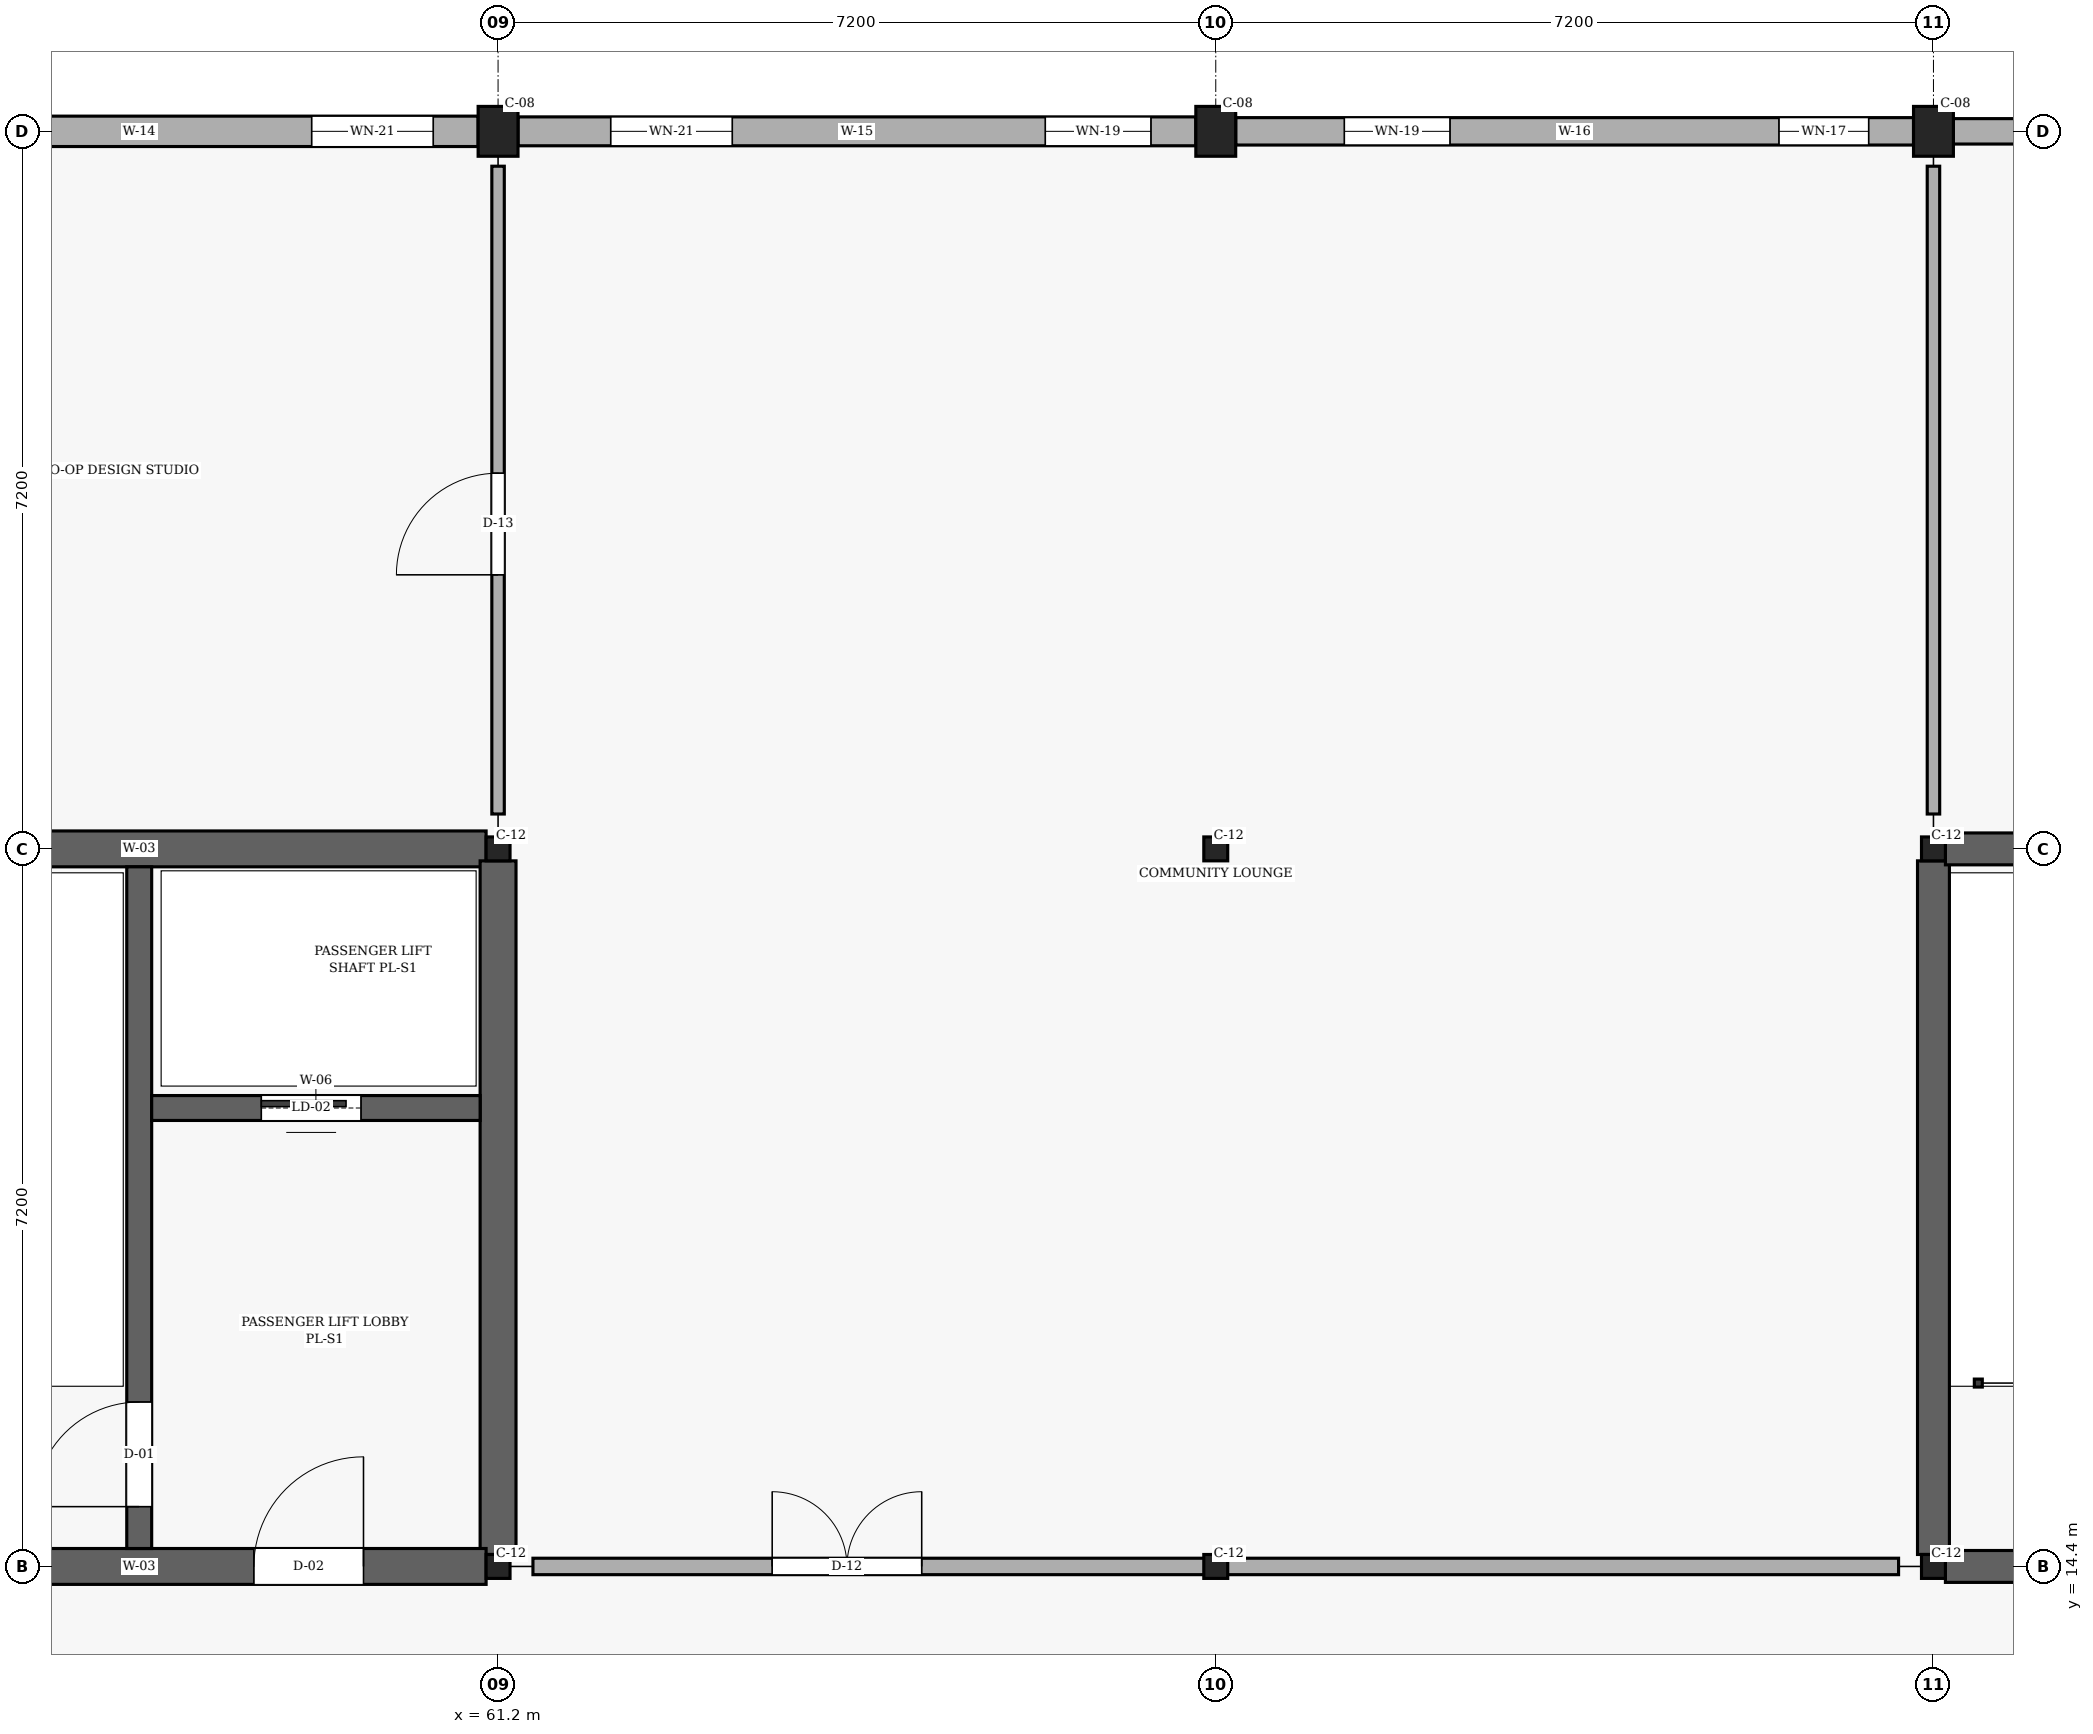
"""IFC4 building model, lengths in metres.
Left out: names, types, materials, properties, quantities, classifications, styles, units other than length and angle.
Written with IfcOpenShell. Run it as: python <this file> out.ifc"""

import sys

from ifc_helpers import new_model, si_unit, direction, frame, frame_2d, origin, origin_2d, place, context, subcontext, project, spatial, rectangle, i_section, extrude, element, fill, save


model = new_model("IFC4")
c1 = context("Model", 3, precision=1e-05, world=origin(), true_north=direction((0.0, 1.0)))
c2 = subcontext(c1, "Body", "Model", "MODEL_VIEW")
j1 = project(units=[si_unit("LENGTHUNIT", "METRE"), si_unit("PLANEANGLEUNIT", "RADIAN")], contexts=[c1])
p1 = place(None, origin())
s1 = spatial("IfcSite", under=j1, at=p1, CompositionType="ELEMENT")
p2 = place(p1, origin())
s2 = spatial("IfcBuilding", under=s1, at=p2, CompositionType="ELEMENT")
p3 = place(p2, frame((0.0, 0.0, 4.5)))
s3 = spatial("IfcBuildingStorey", under=s2, at=p3, CompositionType="ELEMENT", Elevation=4.5)
for number, where, z_axis, x_axis in (
    (1, (61.2, 14.4, 0.0), (0.0, 0.0, 1.0), (1.0, 0.0, 0.0)),
    (2, (61.2, 21.6, 0.0), (0.0, 0.0, 1.0), (1.0, 0.0, 0.0)),
):
    element("IfcColumn", number, at=place(p3, frame(where, z_axis=z_axis, x_axis=x_axis)), inside=s3, PredefinedType="COLUMN", context=c2, shape_type="SweptSolid", body=[
        extrude(i_section(OverallWidth=0.24, OverallDepth=0.24, WebThickness=0.01, FlangeThickness=0.017, FilletRadius=0.021, at=origin_2d()), origin(), (0.0, 0.0, 1.0), 3.15),
    ])
p4 = place(p3, frame((61.2, 28.8, 0.0), z_axis=(0.0, 0.0, 1.0), x_axis=(1.0, 0.0, 0.0)))
e3 = element("IfcColumn", 3, at=p4, inside=s3, PredefinedType="COLUMN", context=c2, shape_type="SweptSolid", body=[
    extrude(rectangle(XDim=0.4, YDim=0.5, at=origin_2d()), origin(), (0.0, 0.0, 1.0), 3.15),
])
for number, where, z_axis, x_axis in (
    (4, (68.4, 14.4, 0.0), (0.0, 0.0, 1.0), (1.0, 0.0, 0.0)),
    (5, (68.4, 21.6, 0.0), (0.0, 0.0, 1.0), (1.0, 0.0, 0.0)),
):
    element("IfcColumn", number, at=place(p3, frame(where, z_axis=z_axis, x_axis=x_axis)), inside=s3, PredefinedType="COLUMN", context=c2, shape_type="SweptSolid", body=[
        extrude(i_section(OverallWidth=0.24, OverallDepth=0.24, WebThickness=0.01, FlangeThickness=0.017, FilletRadius=0.021, at=origin_2d()), origin(), (0.0, 0.0, 1.0), 3.15),
    ])
p5 = place(p3, frame((68.4, 28.8, 0.0), z_axis=(0.0, 0.0, 1.0), x_axis=(1.0, 0.0, 0.0)))
e6 = element("IfcColumn", 6, at=p5, inside=s3, PredefinedType="COLUMN", context=c2, shape_type="SweptSolid", body=[
    extrude(rectangle(XDim=0.4, YDim=0.5, at=origin_2d()), origin(), (0.0, 0.0, 1.0), 3.15),
])
for number, where, z_axis, x_axis in (
    (7, (75.6, 14.4, 0.0), (0.0, 0.0, 1.0), (1.0, 0.0, 0.0)),
    (8, (75.6, 21.6, 0.0), (0.0, 0.0, 1.0), (1.0, 0.0, 0.0)),
):
    element("IfcColumn", number, at=place(p3, frame(where, z_axis=z_axis, x_axis=x_axis)), inside=s3, PredefinedType="COLUMN", context=c2, shape_type="SweptSolid", body=[
        extrude(i_section(OverallWidth=0.24, OverallDepth=0.24, WebThickness=0.01, FlangeThickness=0.017, FilletRadius=0.021, at=origin_2d()), origin(), (0.0, 0.0, 1.0), 3.15),
    ])
p6 = place(p3, frame((75.6, 28.8, 0.0), z_axis=(0.0, 0.0, 1.0), x_axis=(1.0, 0.0, 0.0)))
e9 = element("IfcColumn", 9, at=p6, inside=s3, PredefinedType="COLUMN", context=c2, shape_type="SweptSolid", body=[
    extrude(rectangle(XDim=0.4, YDim=0.5, at=origin_2d()), origin(), (0.0, 0.0, 1.0), 3.15),
])
p7 = place(p3, frame((82.6, 28.8, 0.0), z_axis=(0.0, 0.0, 1.0), x_axis=(-1.0, 0.0, 0.0)))
e10 = element("IfcWall", 10, at=p7, inside=s3, PredefinedType="SOLIDWALL", context=c2, shape_type="SweptSolid", body=[
    extrude(rectangle(XDim=6.8, YDim=0.255, at=frame_2d((3.4, 0.0))), origin(), (0.0, 0.0, 1.0), 2.34),
])
p8 = place(p7, frame((0.45, 0.0, 0.78)))
e11 = element("IfcOpeningElement", 11, at=p8, cuts=e10, PredefinedType="OPENING", context=c2, shape_type="SweptSolid", body=[
    extrude(rectangle(XDim=1.36, YDim=1.26, at=frame_2d((0.68, 0.63))), frame((0.0, 0.137, 0.0), z_axis=(0.0, -1.0, 0.0), x_axis=(1.0, 0.0, 0.0)), (0.0, 0.0, 1.0), 0.275),
])
p9 = place(p7, frame((4.65, 0.0, 0.78)))
e12 = element("IfcOpeningElement", 12, at=p9, cuts=e10, PredefinedType="OPENING", context=c2, shape_type="SweptSolid", body=[
    extrude(rectangle(XDim=0.9, YDim=1.36, at=frame_2d((0.45, 0.68))), frame((0.0, 0.137, 0.0), z_axis=(0.0, -1.0, 0.0), x_axis=(1.0, 0.0, 0.0)), (0.0, 0.0, 1.0), 0.275),
])
p10 = place(p3, frame((75.4, 28.8, 0.0), z_axis=(0.0, 0.0, 1.0), x_axis=(-1.0, 0.0, 0.0)))
e13 = element("IfcWall", 13, at=p10, inside=s3, PredefinedType="SOLIDWALL", context=c2, shape_type="SweptSolid", body=[
    extrude(rectangle(XDim=6.8, YDim=0.275, at=frame_2d((3.4, 0.0))), origin(), (0.0, 0.0, 1.0), 2.34),
])
p11 = place(p10, frame((0.45, 0.0, 0.78)))
e14 = element("IfcOpeningElement", 14, at=p11, cuts=e13, PredefinedType="OPENING", context=c2, shape_type="SweptSolid", body=[
    extrude(rectangle(XDim=0.9, YDim=1.36, at=frame_2d((0.45, 0.68))), frame((0.0, 0.147, 0.0), z_axis=(0.0, -1.0, 0.0), x_axis=(1.0, 0.0, 0.0)), (0.0, 0.0, 1.0), 0.295),
])
p12 = place(p10, frame((4.65, 0.0, 0.78)))
e15 = element("IfcOpeningElement", 15, at=p12, cuts=e13, PredefinedType="OPENING", context=c2, shape_type="SweptSolid", body=[
    extrude(rectangle(XDim=1.06, YDim=1.36, at=frame_2d((0.53, 0.68))), frame((0.0, 0.147, 0.0), z_axis=(0.0, -1.0, 0.0), x_axis=(1.0, 0.0, 0.0)), (0.0, 0.0, 1.0), 0.295),
])
p13 = place(p3, frame((68.2, 28.8, 0.0), z_axis=(0.0, 0.0, 1.0), x_axis=(-1.0, 0.0, 0.0)))
e16 = element("IfcWall", 16, at=p13, inside=s3, PredefinedType="SOLIDWALL", context=c2, shape_type="SweptSolid", body=[
    extrude(rectangle(XDim=6.8, YDim=0.29, at=frame_2d((3.4, 0.0))), origin(), (0.0, 0.0, 1.0), 2.34),
])
p14 = place(p13, frame((0.45, 0.0, 0.78)))
e17 = element("IfcOpeningElement", 17, at=p14, cuts=e16, PredefinedType="OPENING", context=c2, shape_type="SweptSolid", body=[
    extrude(rectangle(XDim=1.06, YDim=1.36, at=frame_2d((0.53, 0.68))), frame((0.0, 0.155, 0.0), z_axis=(0.0, -1.0, 0.0), x_axis=(1.0, 0.0, 0.0)), (0.0, 0.0, 1.0), 0.31),
])
p15 = place(p13, frame((4.65, 0.0, 0.78)))
e18 = element("IfcOpeningElement", 18, at=p15, cuts=e16, PredefinedType="OPENING", context=c2, shape_type="SweptSolid", body=[
    extrude(rectangle(XDim=1.22, YDim=1.36, at=frame_2d((0.61, 0.68))), frame((0.0, 0.155, 0.0), z_axis=(0.0, -1.0, 0.0), x_axis=(1.0, 0.0, 0.0)), (0.0, 0.0, 1.0), 0.31),
])
p16 = place(p3, frame((61.0, 28.8, 0.0), z_axis=(0.0, 0.0, 1.0), x_axis=(-1.0, 0.0, 0.0)))
e19 = element("IfcWall", 19, at=p16, inside=s3, PredefinedType="SOLIDWALL", context=c2, shape_type="SweptSolid", body=[
    extrude(rectangle(XDim=6.8, YDim=0.305, at=frame_2d((3.4, 0.0))), origin(), (0.0, 0.0, 1.0), 2.34),
])
p17 = place(p16, frame((0.45, 0.0, 0.78)))
e20 = element("IfcOpeningElement", 20, at=p17, cuts=e19, PredefinedType="OPENING", context=c2, shape_type="SweptSolid", body=[
    extrude(rectangle(XDim=1.22, YDim=1.36, at=frame_2d((0.61, 0.68))), frame((0.0, 0.163, 0.0), z_axis=(0.0, -1.0, 0.0), x_axis=(1.0, 0.0, 0.0)), (0.0, 0.0, 1.0), 0.325),
])
p18 = place(p16, frame((4.65, 0.0, 0.78)))
e21 = element("IfcOpeningElement", 21, at=p18, cuts=e19, PredefinedType="OPENING", context=c2, shape_type="SweptSolid", body=[
    extrude(rectangle(XDim=1.38, YDim=1.36, at=frame_2d((0.69, 0.68))), frame((0.0, 0.163, 0.0), z_axis=(0.0, -1.0, 0.0), x_axis=(1.0, 0.0, 0.0)), (0.0, 0.0, 1.0), 0.325),
])
for number, where, z_axis, x_axis in (
    (22, (54.12, 21.6, 0.0), (0.0, 0.0, 1.0), (1.0, 0.0, 0.0)),
    (23, (61.2, 14.52, 0.0), (0.0, 0.0, 1.0), (0.0, 1.0, 0.0)),
):
    element("IfcWall", number, at=place(p3, frame(where, z_axis=z_axis, x_axis=x_axis)), inside=s3, PredefinedType="SHEAR", context=c2, shape_type="SweptSolid", body=[
        extrude(rectangle(XDim=6.96, YDim=0.36, at=frame_2d((3.48, 0.0))), origin(), (0.0, 0.0, 1.0), 2.89),
    ])
p19 = place(p3, frame((54.12, 14.4, 0.0), z_axis=(0.0, 0.0, 1.0), x_axis=(1.0, 0.0, 0.0)))
e24 = element("IfcWall", 24, at=p19, inside=s3, PredefinedType="SHEAR", context=c2, shape_type="SweptSolid", body=[
    extrude(rectangle(XDim=6.96, YDim=0.36, at=frame_2d((3.48, 0.0))), origin(), (0.0, 0.0, 1.0), 2.89),
])
p20 = place(p19, frame((4.63, 0.0, 0.0)))
e25 = element("IfcOpeningElement", 25, at=p20, cuts=e24, PredefinedType="OPENING", context=c2, shape_type="SweptSolid", body=[
    extrude(rectangle(XDim=1.1, YDim=2.15, at=frame_2d((0.55, 1.075))), frame((0.0, 0.19, 0.0), z_axis=(0.0, -1.0, 0.0), x_axis=(1.0, 0.0, 0.0)), (0.0, 0.0, 1.0), 0.38),
])
p21 = place(p3, frame((57.6, 14.58, 0.0), z_axis=(0.0, 0.0, 1.0), x_axis=(0.0, 1.0, 0.0)))
e26 = element("IfcWall", 26, at=p21, inside=s3, PredefinedType="SHEAR", context=c2, shape_type="SweptSolid", body=[
    extrude(rectangle(XDim=6.84, YDim=0.25, at=frame_2d((3.42, 0.0))), origin(), (0.0, 0.0, 1.0), 2.89),
])
p22 = place(p21, frame((0.42, 0.0, 0.0)))
e27 = element("IfcOpeningElement", 27, at=p22, cuts=e26, PredefinedType="OPENING", context=c2, shape_type="SweptSolid", body=[
    extrude(rectangle(XDim=1.05, YDim=2.15, at=frame_2d((0.525, 1.075))), frame((0.0, 0.135, 0.0), z_axis=(0.0, -1.0, 0.0), x_axis=(1.0, 0.0, 0.0)), (0.0, 0.0, 1.0), 0.27),
])
p23 = place(p3, frame((57.725, 19.0, 0.0), z_axis=(0.0, 0.0, 1.0), x_axis=(1.0, 0.0, 0.0)))
e28 = element("IfcWall", 28, at=p23, inside=s3, PredefinedType="SHEAR", context=c2, shape_type="SweptSolid", body=[
    extrude(rectangle(XDim=3.295, YDim=0.25, at=frame_2d((1.647, 0.0))), origin(), (0.0, 0.0, 1.0), 2.89),
])
p24 = place(p23, frame((1.1, 0.0, 0.0)))
e29 = element("IfcOpeningElement", 29, at=p24, cuts=e28, PredefinedType="OPENING", context=c2, shape_type="SweptSolid", body=[
    extrude(rectangle(XDim=1.0, YDim=2.2, at=frame_2d((0.5, 1.1))), frame((0.0, 0.135, 0.0), z_axis=(0.0, -1.0, 0.0), x_axis=(1.0, 0.0, 0.0)), (0.0, 0.0, 1.0), 0.27),
])
p25 = place(p3, frame((75.6, 14.52, 0.0), z_axis=(0.0, 0.0, 1.0), x_axis=(0.0, 1.0, 0.0)))
e30 = element("IfcWall", 30, at=p25, inside=s3, PredefinedType="SHEAR", context=c2, shape_type="SweptSolid", body=[
    extrude(rectangle(XDim=6.96, YDim=0.32, at=frame_2d((3.48, 0.0))), origin(), (0.0, 0.0, 1.0), 2.89),
])
p26 = place(p3, frame((75.72, 21.6, 0.0), z_axis=(0.0, 0.0, 1.0), x_axis=(1.0, 0.0, 0.0)))
e31 = element("IfcWall", 31, at=p26, inside=s3, PredefinedType="SHEAR", context=c2, shape_type="SweptSolid", body=[
    extrude(rectangle(XDim=3.32, YDim=0.32, at=frame_2d((1.66, 0.0))), origin(), (0.0, 0.0, 1.0), 2.89),
])
p27 = place(p3, frame((75.72, 14.4, 0.0), z_axis=(0.0, 0.0, 1.0), x_axis=(1.0, 0.0, 0.0)))
e32 = element("IfcWall", 32, at=p27, inside=s3, PredefinedType="SHEAR", context=c2, shape_type="SweptSolid", body=[
    extrude(rectangle(XDim=3.32, YDim=0.32, at=frame_2d((1.66, 0.0))), origin(), (0.0, 0.0, 1.0), 2.89),
])
p28 = place(p27, frame((1.0, 0.0, 0.0)))
e33 = element("IfcOpeningElement", 33, at=p28, cuts=e32, PredefinedType="OPENING", context=c2, shape_type="SweptSolid", body=[
    extrude(rectangle(XDim=1.05, YDim=2.15, at=frame_2d((0.525, 1.075))), frame((0.0, 0.17, 0.0), z_axis=(0.0, -1.0, 0.0), x_axis=(1.0, 0.0, 0.0)), (0.0, 0.0, 1.0), 0.34),
])
p29 = place(p3, frame((61.55, 14.4, 0.0), z_axis=(0.0, 0.0, 1.0), x_axis=(1.0, 0.0, 0.0)))
e34 = element("IfcWall", 34, at=p29, inside=s3, PredefinedType="PARTITIONING", context=c2, shape_type="SweptSolid", body=[
    extrude(rectangle(XDim=13.7, YDim=0.165, at=frame_2d((6.85, 0.0))), origin(), (0.0, 0.0, 1.0), 2.29),
])
p30 = place(p29, frame((2.4, 0.0, 0.0)))
e35 = element("IfcOpeningElement", 35, at=p30, cuts=e34, PredefinedType="OPENING", context=c2, shape_type="SweptSolid", body=[
    extrude(rectangle(XDim=1.5, YDim=2.25, at=frame_2d((0.75, 1.125))), frame((0.0, 0.093, 0.0), z_axis=(0.0, -1.0, 0.0), x_axis=(1.0, 0.0, 0.0)), (0.0, 0.0, 1.0), 0.185),
])
p31 = place(p3, frame((61.2, 21.95, 0.0), z_axis=(0.0, 0.0, 1.0), x_axis=(0.0, 1.0, 0.0)))
e36 = element("IfcWall", 36, at=p31, inside=s3, PredefinedType="PARTITIONING", context=c2, shape_type="SweptSolid", body=[
    extrude(rectangle(XDim=6.5, YDim=0.125, at=frame_2d((3.25, 0.0))), origin(), (0.0, 0.0, 1.0), 2.29),
])
p32 = place(p31, frame((2.4, 0.0, 0.0)))
e37 = element("IfcOpeningElement", 37, at=p32, cuts=e36, PredefinedType="OPENING", context=c2, shape_type="SweptSolid", body=[
    extrude(rectangle(XDim=1.02, YDim=2.15, at=frame_2d((0.51, 1.075))), frame((0.0, 0.073, 0.0), z_axis=(0.0, -1.0, 0.0), x_axis=(1.0, 0.0, 0.0)), (0.0, 0.0, 1.0), 0.145),
])
p33 = place(p3, frame((75.6, 21.95, 0.0), z_axis=(0.0, 0.0, 1.0), x_axis=(0.0, 1.0, 0.0)))
e38 = element("IfcWall", 38, at=p33, inside=s3, PredefinedType="PARTITIONING", context=c2, shape_type="SweptSolid", body=[
    extrude(rectangle(XDim=6.5, YDim=0.125, at=frame_2d((3.25, 0.0))), origin(), (0.0, 0.0, 1.0), 2.29),
])
p34 = place(p11, origin())
e39 = element("IfcWindow", 39, at=p34, inside=s3, PartitioningType="SINGLE_PANEL", PredefinedType="WINDOW", context=c2, shape_type="SweptSolid", body=[
    extrude(rectangle(XDim=0.9, YDim=1.36, at=frame_2d((0.45, 0.68))), frame((0.0, 0.03, 0.0), z_axis=(0.0, -1.0, 0.0), x_axis=(1.0, 0.0, 0.0)), (0.0, 0.0, 1.0), 0.06),
])
fill(e14, e39)
p35 = place(p12, origin())
e40 = element("IfcWindow", 40, at=p35, inside=s3, PartitioningType="SINGLE_PANEL", PredefinedType="WINDOW", context=c2, shape_type="SweptSolid", body=[
    extrude(rectangle(XDim=1.06, YDim=1.36, at=frame_2d((0.53, 0.68))), frame((0.0, 0.03, 0.0), z_axis=(0.0, -1.0, 0.0), x_axis=(1.0, 0.0, 0.0)), (0.0, 0.0, 1.0), 0.06),
])
fill(e15, e40)
p36 = place(p14, origin())
e41 = element("IfcWindow", 41, at=p36, inside=s3, PartitioningType="SINGLE_PANEL", PredefinedType="WINDOW", context=c2, shape_type="SweptSolid", body=[
    extrude(rectangle(XDim=1.06, YDim=1.36, at=frame_2d((0.53, 0.68))), frame((0.0, 0.03, 0.0), z_axis=(0.0, -1.0, 0.0), x_axis=(1.0, 0.0, 0.0)), (0.0, 0.0, 1.0), 0.06),
])
fill(e17, e41)
p37 = place(p15, origin())
e42 = element("IfcWindow", 42, at=p37, inside=s3, PartitioningType="SINGLE_PANEL", PredefinedType="WINDOW", context=c2, shape_type="SweptSolid", body=[
    extrude(rectangle(XDim=1.22, YDim=1.36, at=frame_2d((0.61, 0.68))), frame((0.0, 0.03, 0.0), z_axis=(0.0, -1.0, 0.0), x_axis=(1.0, 0.0, 0.0)), (0.0, 0.0, 1.0), 0.06),
])
fill(e18, e42)
p38 = place(p17, origin())
e43 = element("IfcWindow", 43, at=p38, inside=s3, PartitioningType="SINGLE_PANEL", PredefinedType="WINDOW", context=c2, shape_type="SweptSolid", body=[
    extrude(rectangle(XDim=1.22, YDim=1.36, at=frame_2d((0.61, 0.68))), frame((0.0, 0.03, 0.0), z_axis=(0.0, -1.0, 0.0), x_axis=(1.0, 0.0, 0.0)), (0.0, 0.0, 1.0), 0.06),
])
fill(e20, e43)
p39 = place(p20, frame((1.1, 0.0, 0.0), z_axis=(0.0, 0.0, 1.0), x_axis=(-1.0, 0.0, 0.0)))
e44 = element("IfcDoor", 44, at=p39, inside=s3, OperationType="SINGLE_SWING_RIGHT", PredefinedType="DOOR", context=c2, shape_type="SweptSolid", body=[
    extrude(rectangle(XDim=1.1, YDim=2.15, at=frame_2d((0.55, 1.075))), frame((0.0, 0.025, 0.0), z_axis=(0.0, -1.0, 0.0), x_axis=(1.0, 0.0, 0.0)), (0.0, 0.0, 1.0), 0.05),
])
fill(e25, e44)
p40 = place(p22, origin())
e45 = element("IfcDoor", 45, at=p40, inside=s3, OperationType="SINGLE_SWING_LEFT", PredefinedType="DOOR", context=c2, shape_type="SweptSolid", body=[
    extrude(rectangle(XDim=1.05, YDim=2.15, at=frame_2d((0.525, 1.075))), frame((0.0, 0.025, 0.0), z_axis=(0.0, -1.0, 0.0), x_axis=(1.0, 0.0, 0.0)), (0.0, 0.0, 1.0), 0.05),
])
fill(e27, e45)
p41 = place(p24, origin())
e46 = element("IfcDoor", 46, at=p41, inside=s3, OperationType="SLIDING_TO_LEFT", PredefinedType="DOOR", context=c2, shape_type="SweptSolid", body=[
    extrude(rectangle(XDim=1.0, YDim=2.2, at=frame_2d((0.5, 1.1))), frame((0.0, 0.025, 0.0), z_axis=(0.0, -1.0, 0.0), x_axis=(1.0, 0.0, 0.0)), (0.0, 0.0, 1.0), 0.05),
])
fill(e29, e46)
p42 = place(p30, origin())
e47 = element("IfcDoor", 47, at=p42, inside=s3, OperationType="DOUBLE_DOOR_SINGLE_SWING", PredefinedType="DOOR", context=c2, shape_type="SweptSolid", body=[
    extrude(rectangle(XDim=1.5, YDim=2.25, at=frame_2d((0.75, 1.125))), frame((0.0, 0.025, 0.0), z_axis=(0.0, -1.0, 0.0), x_axis=(1.0, 0.0, 0.0)), (0.0, 0.0, 1.0), 0.05),
])
fill(e35, e47)
p43 = place(p32, origin())
e48 = element("IfcDoor", 48, at=p43, inside=s3, OperationType="SINGLE_SWING_LEFT", PredefinedType="DOOR", context=c2, shape_type="SweptSolid", body=[
    extrude(rectangle(XDim=1.02, YDim=2.15, at=frame_2d((0.51, 1.075))), frame((0.0, 0.025, 0.0), z_axis=(0.0, -1.0, 0.0), x_axis=(1.0, 0.0, 0.0)), (0.0, 0.0, 1.0), 0.05),
])
fill(e37, e48)
save(model, sys.argv[1])
